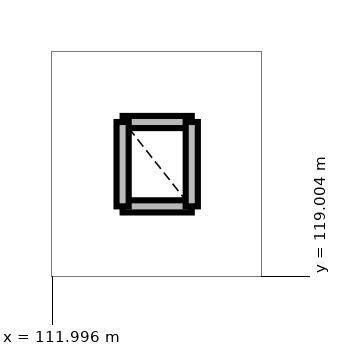
"""IFC4 building model, lengths in metres.
Left out: names, types, materials, properties, quantities, classifications, styles, units other than length and angle.
Written with IfcOpenShell. Run it as: python <this file> out.ifc"""

import sys

from ifc_helpers import new_model, si_unit, direction, frame, frame_2d, origin, place, context, subcontext, project, spatial, rectangle, extrude, element, save


model = new_model("IFC4")
c1 = context("Model", 3, precision=1e-05, world=origin(), true_north=direction((0.0, 1.0)))
c2 = subcontext(c1, "Body", "Model", "MODEL_VIEW")
j1 = project(units=[si_unit("LENGTHUNIT", "METRE"), si_unit("PLANEANGLEUNIT", "RADIAN")], contexts=[c1])
p1 = place(None, origin())
s1 = spatial("IfcSite", under=j1, at=p1, CompositionType="ELEMENT")
p2 = place(p1, origin())
s2 = spatial("IfcBuilding", under=s1, at=p2, CompositionType="ELEMENT")
p3 = place(p2, frame((0.0, 0.0, 9.3)))
s3 = spatial("IfcBuildingStorey", under=s2, at=p3, CompositionType="ELEMENT", Elevation=9.3)
for number, where, z_axis, x_axis in (
    (1, (112.92, 119.92, 0.0), (0.0, 0.0, 1.0), (1.0, 0.0, 0.0)),
    (2, (113.83, 121.03, 0.0), (0.0, 0.0, 1.0), (-1.0, 0.0, 0.0)),
):
    element("IfcWall", number, at=place(p3, frame(where, z_axis=z_axis, x_axis=x_axis)), inside=s3, PredefinedType="PARTITIONING", context=c2, shape_type="SweptSolid", body=[
        extrude(rectangle(XDim=0.91, YDim=0.16, at=frame_2d((0.455, 0.0))), origin(), (0.0, 0.0, 1.0), 3.65),
    ])
for number, where, z_axis, x_axis in (
    (3, (112.92, 121.03, 0.0), (0.0, 0.0, 1.0), (0.0, -1.0, 0.0)),
    (4, (113.83, 119.92, 0.0), (0.0, 0.0, 1.0), (0.0, 1.0, 0.0)),
):
    element("IfcWall", number, at=place(p3, frame(where, z_axis=z_axis, x_axis=x_axis)), inside=s3, PredefinedType="PARTITIONING", context=c2, shape_type="SweptSolid", body=[
        extrude(rectangle(XDim=1.11, YDim=0.16, at=frame_2d((0.555, 0.0))), origin(), (0.0, 0.0, 1.0), 3.65),
    ])
save(model, sys.argv[1])
